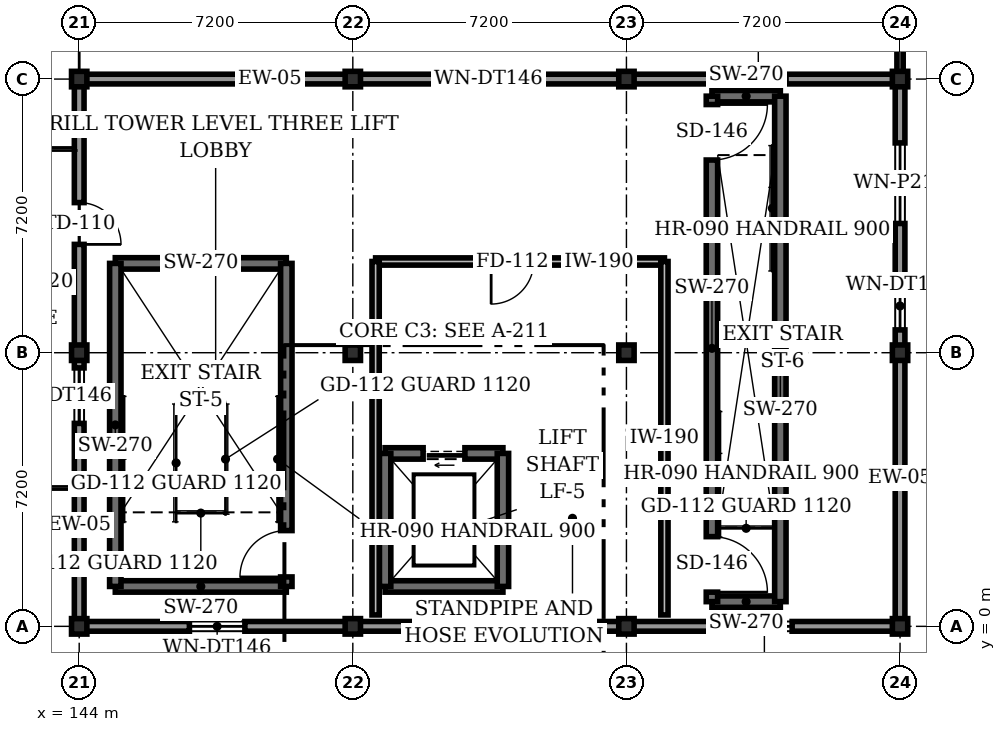
"""IFC4 building model, lengths in metres.
Left out: names, types, materials, properties, quantities, classifications, styles, units other than length and angle.
Written with IfcOpenShell. Run it as: python <this file> out.ifc"""

import sys

from ifc_helpers import new_model, si_unit, direction, frame, frame_2d, origin, origin_2d, place, context, subcontext, project, spatial, rectangle, i_section, extrude, element, fill, save


model = new_model("IFC4")
c1 = context("Model", 3, precision=1e-05, world=origin(), true_north=direction((0.0, 1.0)))
c2 = subcontext(c1, "Body", "Model", "MODEL_VIEW")
j1 = project(units=[si_unit("LENGTHUNIT", "METRE"), si_unit("PLANEANGLEUNIT", "RADIAN")], contexts=[c1])
p1 = place(None, origin())
s1 = spatial("IfcSite", under=j1, at=p1, CompositionType="ELEMENT")
p2 = place(p1, origin())
s2 = spatial("IfcBuilding", under=s1, at=p2, CompositionType="ELEMENT")
p3 = place(p2, frame((0.0, 0.0, 10.2)))
s3 = spatial("IfcBuildingStorey", under=s2, at=p3, CompositionType="ELEMENT", Elevation=10.2)
for number, where, z_axis, x_axis in (
    (1, (144.0, 0.0, 0.0), (0.0, 0.0, 1.0), (1.0, 0.0, 0.0)),
    (2, (144.0, 7.2, 0.0), (0.0, 0.0, 1.0), (1.0, 0.0, 0.0)),
    (3, (144.0, 14.4, 0.0), (0.0, 0.0, 1.0), (1.0, 0.0, 0.0)),
    (4, (151.2, 0.0, 0.0), (0.0, 0.0, 1.0), (1.0, 0.0, 0.0)),
    (5, (151.2, 7.2, 0.0), (0.0, 0.0, 1.0), (1.0, 0.0, 0.0)),
    (6, (151.2, 14.4, 0.0), (0.0, 0.0, 1.0), (1.0, 0.0, 0.0)),
    (7, (158.4, 0.0, 0.0), (0.0, 0.0, 1.0), (1.0, 0.0, 0.0)),
    (8, (158.4, 7.2, 0.0), (0.0, 0.0, 1.0), (1.0, 0.0, 0.0)),
    (9, (158.4, 14.4, 0.0), (0.0, 0.0, 1.0), (1.0, 0.0, 0.0)),
    (10, (165.6, 0.0, 0.0), (0.0, 0.0, 1.0), (1.0, 0.0, 0.0)),
    (11, (165.6, 7.2, 0.0), (0.0, 0.0, 1.0), (1.0, 0.0, 0.0)),
    (12, (165.6, 14.4, 0.0), (0.0, 0.0, 1.0), (1.0, 0.0, 0.0)),
):
    element("IfcColumn", number, at=place(p3, frame(where, z_axis=z_axis, x_axis=x_axis)), inside=s3, PredefinedType="COLUMN", context=c2, shape_type="SweptSolid", body=[
        extrude(i_section(OverallWidth=0.404, OverallDepth=0.407, WebThickness=0.027, FlangeThickness=0.044, at=origin_2d()), origin(), (0.0, 0.0, 1.0), 4.2),
    ])
p4 = place(p3, frame((165.6, 0.0, 0.0), z_axis=(0.0, 0.0, 1.0), x_axis=(-1.0, 0.0, 0.0)))
e13 = element("IfcWall", 13, at=p4, inside=s3, PredefinedType="STANDARD", context=c2, shape_type="SweptSolid", body=[
    extrude(rectangle(XDim=21.6, YDim=0.255, at=frame_2d((10.8, 0.0))), origin(), (0.0, 0.0, 1.0), 3.2),
])
p5 = place(p4, frame((17.24, 0.0, 1.15)))
e14 = element("IfcOpeningElement", 14, at=p5, cuts=e13, PredefinedType="OPENING", context=c2, shape_type="SweptSolid", body=[
    extrude(rectangle(XDim=1.46, YDim=1.46, at=frame_2d((0.73, 0.73))), frame((0.0, 0.137, 0.0), z_axis=(0.0, -1.0, 0.0), x_axis=(1.0, 0.0, 0.0)), (0.0, 0.0, 1.0), 0.275),
])
p6 = place(p4, frame((2.84, 0.0, 1.15)))
e15 = element("IfcOpeningElement", 15, at=p6, cuts=e13, PredefinedType="OPENING", context=c2, shape_type="SweptSolid", body=[
    extrude(rectangle(XDim=1.46, YDim=1.46, at=frame_2d((0.73, 0.73))), frame((0.0, 0.137, 0.0), z_axis=(0.0, -1.0, 0.0), x_axis=(1.0, 0.0, 0.0)), (0.0, 0.0, 1.0), 0.275),
])
p7 = place(p3, frame((165.6, 0.0, 0.0), z_axis=(0.0, 0.0, 1.0), x_axis=(0.0, 1.0, 0.0)))
e16 = element("IfcWall", 16, at=p7, inside=s3, PredefinedType="STANDARD", context=c2, shape_type="SweptSolid", body=[
    extrude(rectangle(XDim=14.4, YDim=0.255, at=frame_2d((7.2, 0.0))), origin(), (0.0, 0.0, 1.0), 3.2),
])
p8 = place(p7, frame((7.8, 0.0, 1.05)))
e17 = element("IfcOpeningElement", 17, at=p8, cuts=e16, PredefinedType="OPENING", context=c2, shape_type="SweptSolid", body=[
    extrude(rectangle(XDim=1.26, YDim=1.38, at=frame_2d((0.63, 0.69))), frame((0.0, 0.137, 0.0), z_axis=(0.0, -1.0, 0.0), x_axis=(1.0, 0.0, 0.0)), (0.0, 0.0, 1.0), 0.275),
])
p9 = place(p7, frame((10.6, 0.0, 1.05)))
e18 = element("IfcOpeningElement", 18, at=p9, cuts=e16, PredefinedType="OPENING", context=c2, shape_type="SweptSolid", body=[
    extrude(rectangle(XDim=2.12, YDim=1.76, at=frame_2d((1.06, 0.88))), frame((0.0, 0.137, 0.0), z_axis=(0.0, -1.0, 0.0), x_axis=(1.0, 0.0, 0.0)), (0.0, 0.0, 1.0), 0.275),
])
p10 = place(p3, frame((144.0, 14.4, 0.0), z_axis=(0.0, 0.0, 1.0), x_axis=(0.0, -1.0, 0.0)))
e19 = element("IfcWall", 19, at=p10, inside=s3, PredefinedType="STANDARD", context=c2, shape_type="SweptSolid", body=[
    extrude(rectangle(XDim=14.4, YDim=0.255, at=frame_2d((7.2, 0.0))), origin(), (0.0, 0.0, 1.0), 3.2),
])
p11 = place(p10, frame((3.25, 0.0, 0.0)))
e20 = element("IfcOpeningElement", 20, at=p11, cuts=e19, PredefinedType="OPENING", context=c2, shape_type="SweptSolid", body=[
    extrude(rectangle(XDim=1.1, YDim=2.18, at=frame_2d((0.55, 1.09))), frame((0.0, 0.137, 0.0), z_axis=(0.0, -1.0, 0.0), x_axis=(1.0, 0.0, 0.0)), (0.0, 0.0, 1.0), 0.275),
])
p12 = place(p10, frame((7.6, 0.0, 1.05)))
e21 = element("IfcOpeningElement", 21, at=p12, cuts=e19, PredefinedType="OPENING", context=c2, shape_type="SweptSolid", body=[
    extrude(rectangle(XDim=1.46, YDim=1.46, at=frame_2d((0.73, 0.73))), frame((0.0, 0.137, 0.0), z_axis=(0.0, -1.0, 0.0), x_axis=(1.0, 0.0, 0.0)), (0.0, 0.0, 1.0), 0.275),
])
p13 = place(p3, frame((165.6, 14.4, 0.0), z_axis=(0.0, 0.0, 1.0), x_axis=(-1.0, 0.0, 0.0)))
e22 = element("IfcWall", 22, at=p13, inside=s3, PredefinedType="STANDARD", context=c2, shape_type="SweptSolid", body=[
    extrude(rectangle(XDim=21.6, YDim=0.255, at=frame_2d((10.8, 0.0))), origin(), (0.0, 0.0, 1.0), 3.2),
])
p14 = place(p13, frame((3.0, 0.0, 1.15)))
e23 = element("IfcOpeningElement", 23, at=p14, cuts=e22, PredefinedType="OPENING", context=c2, shape_type="SweptSolid", body=[
    extrude(rectangle(XDim=1.46, YDim=1.46, at=frame_2d((0.73, 0.73))), frame((0.0, 0.137, 0.0), z_axis=(0.0, -1.0, 0.0), x_axis=(1.0, 0.0, 0.0)), (0.0, 0.0, 1.0), 0.275),
])
p15 = place(p13, frame((10.1, 0.0, 1.15)))
e24 = element("IfcOpeningElement", 24, at=p15, cuts=e22, PredefinedType="OPENING", context=c2, shape_type="SweptSolid", body=[
    extrude(rectangle(XDim=1.46, YDim=1.46, at=frame_2d((0.73, 0.73))), frame((0.0, 0.137, 0.0), z_axis=(0.0, -1.0, 0.0), x_axis=(1.0, 0.0, 0.0)), (0.0, 0.0, 1.0), 0.275),
])
p16 = place(p3, frame((165.6, 14.4, 0.0), z_axis=(0.0, 0.0, 1.0), x_axis=(0.0, 1.0, 0.0)))
e25 = element("IfcWall", 25, at=p16, inside=s3, PredefinedType="PARAPET", context=c2, shape_type="SweptSolid", body=[
    extrude(rectangle(XDim=21.6, YDim=0.165, at=frame_2d((10.8, 0.0))), origin(), (0.0, 0.0, 1.0), 1.15),
])
for number, where, z_axis, x_axis in (
    (26, (144.95, 1.05, 0.0), (0.0, 0.0, 1.0), (1.0, 0.0, 0.0)),
    (27, (149.45, 9.55, 0.0), (0.0, 0.0, 1.0), (-1.0, 0.0, 0.0)),
):
    element("IfcWall", number, at=place(p3, frame(where, z_axis=z_axis, x_axis=x_axis)), inside=s3, PredefinedType="SHEAR", context=c2, shape_type="SweptSolid", body=[
        extrude(rectangle(XDim=4.5, YDim=0.3, at=frame_2d((2.25, 0.0))), origin(), (0.0, 0.0, 1.0), 3.95),
    ])
p17 = place(p3, frame((144.95, 9.55, 0.0), z_axis=(0.0, 0.0, 1.0), x_axis=(0.0, -1.0, 0.0)))
e28 = element("IfcWall", 28, at=p17, inside=s3, PredefinedType="SHEAR", context=c2, shape_type="SweptSolid", body=[
    extrude(rectangle(XDim=8.5, YDim=0.3, at=frame_2d((4.25, 0.0))), origin(), (0.0, 0.0, 1.0), 3.95),
])
p18 = place(p3, frame((149.45, 1.05, 0.0), z_axis=(0.0, 0.0, 1.0), x_axis=(0.0, 1.0, 0.0)))
e29 = element("IfcWall", 29, at=p18, inside=s3, PredefinedType="SHEAR", context=c2, shape_type="SweptSolid", body=[
    extrude(rectangle(XDim=8.5, YDim=0.3, at=frame_2d((4.25, 0.0))), origin(), (0.0, 0.0, 1.0), 3.95),
])
p19 = place(p18, frame((0.25, 0.0, 0.0)))
e30 = element("IfcOpeningElement", 30, at=p19, cuts=e29, PredefinedType="OPENING", context=c2, shape_type="SweptSolid", body=[
    extrude(rectangle(XDim=1.22, YDim=2.16, at=frame_2d((0.61, 1.08))), frame((0.0, 0.16, 0.0), z_axis=(0.0, -1.0, 0.0), x_axis=(1.0, 0.0, 0.0)), (0.0, 0.0, 1.0), 0.32),
])
p20 = place(p3, frame((152.05, 1.05, 0.0), z_axis=(0.0, 0.0, 1.0), x_axis=(1.0, 0.0, 0.0)))
e31 = element("IfcWall", 31, at=p20, inside=s3, PredefinedType="SHEAR", context=c2, shape_type="SweptSolid", body=[
    extrude(rectangle(XDim=3.1, YDim=0.3, at=frame_2d((1.55, 0.0))), origin(), (0.0, 0.0, 1.0), 3.95),
])
p21 = place(p3, frame((155.15, 4.55, 0.0), z_axis=(0.0, 0.0, 1.0), x_axis=(-1.0, 0.0, 0.0)))
e32 = element("IfcWall", 32, at=p21, inside=s3, PredefinedType="SHEAR", context=c2, shape_type="SweptSolid", body=[
    extrude(rectangle(XDim=3.1, YDim=0.3, at=frame_2d((1.55, 0.0))), origin(), (0.0, 0.0, 1.0), 3.95),
])
p22 = place(p21, frame((1.0, 0.0, 0.0)))
e33 = element("IfcOpeningElement", 33, at=p22, cuts=e32, PredefinedType="OPENING", context=c2, shape_type="SweptSolid", body=[
    extrude(rectangle(XDim=1.1, YDim=2.22, at=frame_2d((0.55, 1.11))), frame((0.0, 0.16, 0.0), z_axis=(0.0, -1.0, 0.0), x_axis=(1.0, 0.0, 0.0)), (0.0, 0.0, 1.0), 0.32),
])
for number, where, z_axis, x_axis in (
    (34, (152.05, 4.55, 0.0), (0.0, 0.0, 1.0), (0.0, -1.0, 0.0)),
    (35, (155.15, 1.05, 0.0), (0.0, 0.0, 1.0), (0.0, 1.0, 0.0)),
):
    element("IfcWall", number, at=place(p3, frame(where, z_axis=z_axis, x_axis=x_axis)), inside=s3, PredefinedType="SHEAR", context=c2, shape_type="SweptSolid", body=[
        extrude(rectangle(XDim=3.5, YDim=0.3, at=frame_2d((1.75, 0.0))), origin(), (0.0, 0.0, 1.0), 3.95),
    ])
for number, where, z_axis, x_axis in (
    (36, (160.65, 0.65, 0.0), (0.0, 0.0, 1.0), (1.0, 0.0, 0.0)),
    (37, (162.45, 13.95, 0.0), (0.0, 0.0, 1.0), (-1.0, 0.0, 0.0)),
):
    element("IfcWall", number, at=place(p3, frame(where, z_axis=z_axis, x_axis=x_axis)), inside=s3, PredefinedType="SHEAR", context=c2, shape_type="SweptSolid", body=[
        extrude(rectangle(XDim=1.8, YDim=0.3, at=frame_2d((0.9, 0.0))), origin(), (0.0, 0.0, 1.0), 3.95),
    ])
p23 = place(p3, frame((160.65, 13.95, 0.0), z_axis=(0.0, 0.0, 1.0), x_axis=(0.0, -1.0, 0.0)))
e38 = element("IfcWall", 38, at=p23, inside=s3, PredefinedType="SHEAR", context=c2, shape_type="SweptSolid", body=[
    extrude(rectangle(XDim=13.3, YDim=0.3, at=frame_2d((6.65, 0.0))), origin(), (0.0, 0.0, 1.0), 3.95),
])
p24 = place(p23, frame((11.59, 0.0, 0.0)))
e39 = element("IfcOpeningElement", 39, at=p24, cuts=e38, PredefinedType="OPENING", context=c2, shape_type="SweptSolid", body=[
    extrude(rectangle(XDim=1.46, YDim=2.24, at=frame_2d((0.73, 1.12))), frame((0.0, 0.16, 0.0), z_axis=(0.0, -1.0, 0.0), x_axis=(1.0, 0.0, 0.0)), (0.0, 0.0, 1.0), 0.32),
])
p25 = place(p23, frame((0.22, 0.0, 0.0)))
e40 = element("IfcOpeningElement", 40, at=p25, cuts=e38, PredefinedType="OPENING", context=c2, shape_type="SweptSolid", body=[
    extrude(rectangle(XDim=1.46, YDim=2.24, at=frame_2d((0.73, 1.12))), frame((0.0, 0.16, 0.0), z_axis=(0.0, -1.0, 0.0), x_axis=(1.0, 0.0, 0.0)), (0.0, 0.0, 1.0), 0.32),
])
p26 = place(p3, frame((162.45, 0.65, 0.0), z_axis=(0.0, 0.0, 1.0), x_axis=(0.0, 1.0, 0.0)))
e41 = element("IfcWall", 41, at=p26, inside=s3, PredefinedType="SHEAR", context=c2, shape_type="SweptSolid", body=[
    extrude(rectangle(XDim=13.3, YDim=0.3, at=frame_2d((6.65, 0.0))), origin(), (0.0, 0.0, 1.0), 3.95),
])
p27 = place(p3, frame((159.4, 9.6, 0.0), z_axis=(0.0, 0.0, 1.0), x_axis=(-1.0, 0.0, 0.0)))
e42 = element("IfcWall", 42, at=p27, inside=s3, PredefinedType="STANDARD", context=c2, shape_type="SweptSolid", body=[
    extrude(rectangle(XDim=7.6, YDim=0.19, at=frame_2d((3.8, 0.0))), origin(), (0.0, 0.0, 1.0), 3.338),
])
p28 = place(p27, frame((3.44, 0.0, 0.0)))
e43 = element("IfcOpeningElement", 43, at=p28, cuts=e42, PredefinedType="OPENING", context=c2, shape_type="SweptSolid", body=[
    extrude(rectangle(XDim=1.12, YDim=2.16, at=frame_2d((0.56, 1.08))), frame((0.0, 0.105, 0.0), z_axis=(0.0, -1.0, 0.0), x_axis=(1.0, 0.0, 0.0)), (0.0, 0.0, 1.0), 0.21),
])
p29 = place(p3, frame((151.8, 9.6, 0.0), z_axis=(0.0, 0.0, 1.0), x_axis=(0.0, -1.0, 0.0)))
e44 = element("IfcWall", 44, at=p29, inside=s3, PredefinedType="STANDARD", context=c2, shape_type="SweptSolid", body=[
    extrude(rectangle(XDim=9.3, YDim=0.19, at=frame_2d((4.65, 0.0))), origin(), (0.0, 0.0, 1.0), 3.257),
])
p30 = place(p3, frame((159.4, 0.3, 0.0), z_axis=(0.0, 0.0, 1.0), x_axis=(0.0, 1.0, 0.0)))
e45 = element("IfcWall", 45, at=p30, inside=s3, PredefinedType="STANDARD", context=c2, shape_type="SweptSolid", body=[
    extrude(rectangle(XDim=9.3, YDim=0.19, at=frame_2d((4.65, 0.0))), origin(), (0.0, 0.0, 1.0), 3.95),
])
p31 = place(p5, origin())
e46 = element("IfcWindow", 46, at=p31, inside=s3, PartitioningType="SINGLE_PANEL", PredefinedType="WINDOW", context=c2, shape_type="SweptSolid", body=[
    extrude(rectangle(XDim=1.46, YDim=1.46, at=frame_2d((0.73, 0.73))), frame((0.0, 0.03, 0.0), z_axis=(0.0, -1.0, 0.0), x_axis=(1.0, 0.0, 0.0)), (0.0, 0.0, 1.0), 0.06),
])
fill(e14, e46)
p32 = place(p6, origin())
e47 = element("IfcWindow", 47, at=p32, inside=s3, PartitioningType="SINGLE_PANEL", PredefinedType="WINDOW", context=c2, shape_type="SweptSolid", body=[
    extrude(rectangle(XDim=1.46, YDim=1.46, at=frame_2d((0.73, 0.73))), frame((0.0, 0.03, 0.0), z_axis=(0.0, -1.0, 0.0), x_axis=(1.0, 0.0, 0.0)), (0.0, 0.0, 1.0), 0.06),
])
fill(e15, e47)
p33 = place(p8, origin())
e48 = element("IfcWindow", 48, at=p33, inside=s3, PartitioningType="SINGLE_PANEL", PredefinedType="WINDOW", context=c2, shape_type="SweptSolid", body=[
    extrude(rectangle(XDim=1.26, YDim=1.38, at=frame_2d((0.63, 0.69))), frame((0.0, 0.03, 0.0), z_axis=(0.0, -1.0, 0.0), x_axis=(1.0, 0.0, 0.0)), (0.0, 0.0, 1.0), 0.06),
])
fill(e17, e48)
p34 = place(p9, origin())
e49 = element("IfcWindow", 49, at=p34, inside=s3, PartitioningType="SINGLE_PANEL", PredefinedType="WINDOW", context=c2, shape_type="SweptSolid", body=[
    extrude(rectangle(XDim=2.12, YDim=1.76, at=frame_2d((1.06, 0.88))), frame((0.0, 0.03, 0.0), z_axis=(0.0, -1.0, 0.0), x_axis=(1.0, 0.0, 0.0)), (0.0, 0.0, 1.0), 0.06),
])
fill(e18, e49)
p35 = place(p11, origin())
e50 = element("IfcDoor", 50, at=p35, inside=s3, OperationType="SINGLE_SWING_RIGHT", PredefinedType="DOOR", context=c2, shape_type="SweptSolid", body=[
    extrude(rectangle(XDim=1.1, YDim=2.18, at=frame_2d((0.55, 1.09))), frame((0.0, 0.025, 0.0), z_axis=(0.0, -1.0, 0.0), x_axis=(1.0, 0.0, 0.0)), (0.0, 0.0, 1.0), 0.05),
])
fill(e20, e50)
p36 = place(p12, origin())
e51 = element("IfcWindow", 51, at=p36, inside=s3, PartitioningType="SINGLE_PANEL", PredefinedType="WINDOW", context=c2, shape_type="SweptSolid", body=[
    extrude(rectangle(XDim=1.46, YDim=1.46, at=frame_2d((0.73, 0.73))), frame((0.0, 0.03, 0.0), z_axis=(0.0, -1.0, 0.0), x_axis=(1.0, 0.0, 0.0)), (0.0, 0.0, 1.0), 0.06),
])
fill(e21, e51)
p37 = place(p14, origin())
e52 = element("IfcWindow", 52, at=p37, inside=s3, PartitioningType="SINGLE_PANEL", PredefinedType="WINDOW", context=c2, shape_type="SweptSolid", body=[
    extrude(rectangle(XDim=1.46, YDim=1.46, at=frame_2d((0.73, 0.73))), frame((0.0, 0.03, 0.0), z_axis=(0.0, -1.0, 0.0), x_axis=(1.0, 0.0, 0.0)), (0.0, 0.0, 1.0), 0.06),
])
fill(e23, e52)
p38 = place(p15, origin())
e53 = element("IfcWindow", 53, at=p38, inside=s3, PartitioningType="SINGLE_PANEL", PredefinedType="WINDOW", context=c2, shape_type="SweptSolid", body=[
    extrude(rectangle(XDim=1.46, YDim=1.46, at=frame_2d((0.73, 0.73))), frame((0.0, 0.03, 0.0), z_axis=(0.0, -1.0, 0.0), x_axis=(1.0, 0.0, 0.0)), (0.0, 0.0, 1.0), 0.06),
])
fill(e24, e53)
p39 = place(p19, origin())
e54 = element("IfcDoor", 54, at=p39, inside=s3, OperationType="SINGLE_SWING_LEFT", PredefinedType="DOOR", context=c2, shape_type="SweptSolid", body=[
    extrude(rectangle(XDim=1.22, YDim=2.16, at=frame_2d((0.61, 1.08))), frame((0.0, 0.025, 0.0), z_axis=(0.0, -1.0, 0.0), x_axis=(1.0, 0.0, 0.0)), (0.0, 0.0, 1.0), 0.05),
])
fill(e30, e54)
p40 = place(p22, origin())
e55 = element("IfcDoor", 55, at=p40, inside=s3, OperationType="SLIDING_TO_LEFT", PredefinedType="DOOR", context=c2, shape_type="SweptSolid", body=[
    extrude(rectangle(XDim=1.1, YDim=2.22, at=frame_2d((0.55, 1.11))), frame((0.0, 0.025, 0.0), z_axis=(0.0, -1.0, 0.0), x_axis=(1.0, 0.0, 0.0)), (0.0, 0.0, 1.0), 0.05),
])
fill(e33, e55)
p41 = place(p24, origin())
e56 = element("IfcDoor", 56, at=p41, inside=s3, OperationType="SINGLE_SWING_RIGHT", PredefinedType="DOOR", context=c2, shape_type="SweptSolid", body=[
    extrude(rectangle(XDim=1.46, YDim=2.24, at=frame_2d((0.73, 1.12))), frame((0.0, 0.025, 0.0), z_axis=(0.0, -1.0, 0.0), x_axis=(1.0, 0.0, 0.0)), (0.0, 0.0, 1.0), 0.05),
])
fill(e39, e56)
p42 = place(p25, origin())
e57 = element("IfcDoor", 57, at=p42, inside=s3, OperationType="SINGLE_SWING_LEFT", PredefinedType="DOOR", context=c2, shape_type="SweptSolid", body=[
    extrude(rectangle(XDim=1.46, YDim=2.24, at=frame_2d((0.73, 1.12))), frame((0.0, 0.025, 0.0), z_axis=(0.0, -1.0, 0.0), x_axis=(1.0, 0.0, 0.0)), (0.0, 0.0, 1.0), 0.05),
])
fill(e40, e57)
p43 = place(p28, origin())
e58 = element("IfcDoor", 58, at=p43, inside=s3, OperationType="SINGLE_SWING_RIGHT", PredefinedType="DOOR", context=c2, shape_type="SweptSolid", body=[
    extrude(rectangle(XDim=1.12, YDim=2.16, at=frame_2d((0.56, 1.08))), frame((0.0, 0.025, 0.0), z_axis=(0.0, -1.0, 0.0), x_axis=(1.0, 0.0, 0.0)), (0.0, 0.0, 1.0), 0.05),
])
fill(e43, e58)
save(model, sys.argv[1])
